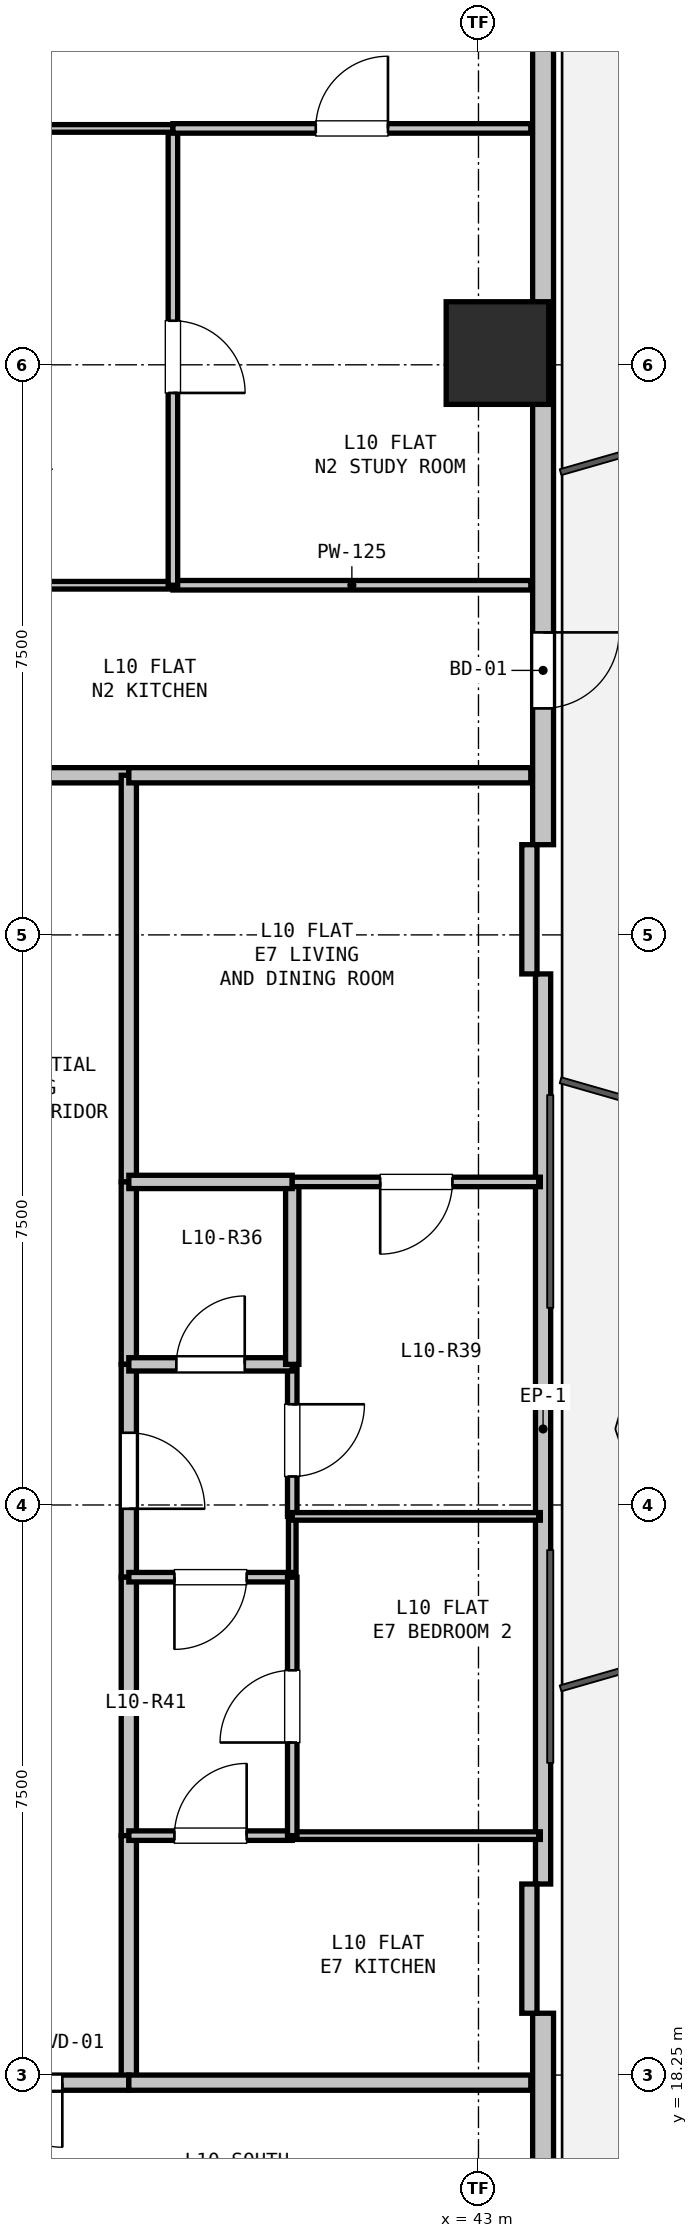
"""IFC4 building model, lengths in metres.
Left out: names, types, materials, properties, quantities, classifications, styles, units other than length and angle.
Written with IfcOpenShell. Run it as: python <this file> out.ifc"""

import sys

from ifc_helpers import new_model, si_unit, direction, frame, frame_2d, origin, origin_2d, place, context, subcontext, project, spatial, rectangle, hollow_rectangle, extrude, element, fill, save


model = new_model("IFC4")
c1 = context("Model", 3, precision=1e-05, world=origin(), true_north=direction((0.0, 1.0)))
c2 = subcontext(c1, "Body", "Model", "MODEL_VIEW")
j1 = project(units=[si_unit("LENGTHUNIT", "METRE"), si_unit("PLANEANGLEUNIT", "RADIAN")], contexts=[c1])
p1 = place(None, origin())
s1 = spatial("IfcSite", under=j1, at=p1, CompositionType="ELEMENT")
p2 = place(p1, origin())
s2 = spatial("IfcBuilding", under=s1, at=p2, CompositionType="ELEMENT")
p3 = place(p2, frame((0.0, 0.0, 39.0)))
s3 = spatial("IfcBuildingStorey", under=s2, at=p3, CompositionType="ELEMENT", Elevation=39.0)
p4 = place(p3, frame((43.25, 40.905, 0.0), z_axis=(0.0, 0.0, 1.0), x_axis=(1.0, 0.0, 0.0)))
e1 = element("IfcColumn", 1, at=p4, inside=s3, PredefinedType="COLUMN", context=c2, shape_type="SweptSolid", body=[
    extrude(hollow_rectangle(XDim=1.35, YDim=1.35, WallThickness=0.036, at=origin_2d()), origin(), (0.0, 0.0, 1.0), 3.3),
])
p5 = place(p3, frame((28.232, 43.454, 0.0), z_axis=(0.0, 0.0, 1.0), x_axis=(0.86603192154, 0.499988710747, 0.0)))
e2 = element("IfcWall", 2, at=p5, inside=s3, PredefinedType="SOLIDWALL", context=c2, shape_type="SweptSolid", body=[
    extrude(rectangle(XDim=12.673, YDim=0.275, at=frame_2d((6.336, 0.0))), origin(), (0.0, 0.0, 1.0), 2.66),
])
p6 = place(p5, frame((2.96, 0.0, 0.9)))
e3 = element("IfcOpeningElement", 3, at=p6, cuts=e2, PredefinedType="OPENING", context=c2, shape_type="SweptSolid", body=[
    extrude(rectangle(XDim=2.1, YDim=1.6, at=frame_2d((1.05, 0.8))), frame((0.0, 0.147, 0.0), z_axis=(0.0, -1.0, 0.0), x_axis=(1.0, 0.0, 0.0)), (0.0, 0.0, 1.0), 0.295),
])
p7 = place(p3, frame((43.85, 47.11, 0.0), z_axis=(0.0, 0.0, 1.0), x_axis=(0.0, -1.0, 0.0)))
e4 = element("IfcWall", 4, at=p7, inside=s3, PredefinedType="SOLIDWALL", context=c2, shape_type="SweptSolid", body=[
    extrude(rectangle(XDim=12.673, YDim=0.275, at=frame_2d((6.336, 0.0))), origin(), (0.0, 0.0, 1.0), 2.66),
])
p8 = place(p7, frame((9.88, 0.0, 0.0)))
e5 = element("IfcOpeningElement", 5, at=p8, cuts=e4, PredefinedType="OPENING", context=c2, shape_type="SweptSolid", body=[
    extrude(rectangle(XDim=1.0, YDim=2.1, at=frame_2d((0.5, 1.05))), frame((0.0, 0.147, 0.0), z_axis=(0.0, -1.0, 0.0), x_axis=(1.0, 0.0, 0.0)), (0.0, 0.0, 1.0), 0.295),
])
p9 = place(p3, frame((43.85, 32.737, 0.0), z_axis=(0.0, 0.0, 1.0), x_axis=(0.0, -1.0, 0.0)))
e6 = element("IfcWall", 6, at=p9, inside=s3, PredefinedType="PARAPET", context=c2, shape_type="SweptSolid", body=[
    extrude(rectangle(XDim=11.973, YDim=0.2, at=frame_2d((5.987, 0.0))), origin(), (0.0, 0.0, 1.0), 0.2),
])
p10 = place(p3, frame((43.85, 19.063, 0.0), z_axis=(0.0, 0.0, 1.0), x_axis=(0.0, -1.0, 0.0)))
e7 = element("IfcWall", 7, at=p10, inside=s3, PredefinedType="SOLIDWALL", context=c2, shape_type="SweptSolid", body=[
    extrude(rectangle(XDim=12.673, YDim=0.275, at=frame_2d((6.336, 0.0))), origin(), (0.0, 0.0, 1.0), 2.66),
])
for number, where, z_axis, x_axis in (
    (8, (43.67, 34.437, 0.0), (0.0, 0.0, 1.0), (0.0, -1.0, 0.0)),
    (9, (43.67, 20.763, 0.0), (0.0, 0.0, 1.0), (0.0, -1.0, 0.0)),
):
    element("IfcWall", number, at=place(p3, frame(where, z_axis=z_axis, x_axis=x_axis)), inside=s3, PredefinedType="PARAPET", context=c2, shape_type="SweptSolid", body=[
        extrude(rectangle(XDim=1.7, YDim=0.2, at=frame_2d((0.85, 0.0))), origin(), (0.0, 0.0, 1.0), 2.66),
    ])
p11 = place(p3, frame((35.8, 35.35, 0.0), z_axis=(0.0, 0.0, 1.0), x_axis=(1.0, 0.0, 0.0)))
e10 = element("IfcWall", 10, at=p11, inside=s3, PredefinedType="PARTITIONING", context=c2, shape_type="SweptSolid", body=[
    extrude(rectangle(XDim=2.6, YDim=0.2, at=frame_2d((1.3, 0.0))), origin(), (0.0, 0.0, 1.0), 2.337),
])
p12 = place(p3, frame((38.4, 35.35, 0.0), z_axis=(0.0, 0.0, 1.0), x_axis=(0.0, -1.0, 0.0)))
e11 = element("IfcWall", 11, at=p12, inside=s3, PredefinedType="PARTITIONING", context=c2, shape_type="SweptSolid", body=[
    extrude(rectangle(XDim=5.35, YDim=0.2, at=frame_2d((2.675, 0.0))), origin(), (0.0, 0.0, 1.0), 2.337),
])
p13 = place(p3, frame((38.4, 30.0, 0.0), z_axis=(0.0, 0.0, 1.0), x_axis=(0.0, -1.0, 0.0)))
e12 = element("IfcWall", 12, at=p13, inside=s3, PredefinedType="PARTITIONING", context=c2, shape_type="SweptSolid", body=[
    extrude(rectangle(XDim=2.4, YDim=0.2, at=frame_2d((1.2, 0.0))), origin(), (0.0, 0.0, 1.0), 3.04),
])
p14 = place(p3, frame((38.4, 27.6, 0.0), z_axis=(0.0, 0.0, 1.0), x_axis=(0.0, -1.0, 0.0)))
e13 = element("IfcWall", 13, at=p14, inside=s3, PredefinedType="PARTITIONING", context=c2, shape_type="SweptSolid", body=[
    extrude(rectangle(XDim=2.8, YDim=0.2, at=frame_2d((1.4, 0.0))), origin(), (0.0, 0.0, 1.0), 3.04),
])
p15 = place(p14, frame((0.9, 0.0, 0.0)))
e14 = element("IfcOpeningElement", 14, at=p15, cuts=e13, PredefinedType="OPENING", context=c2, shape_type="SweptSolid", body=[
    extrude(rectangle(XDim=1.0, YDim=2.15, at=frame_2d((0.5, 1.075))), frame((0.0, 0.11, 0.0), z_axis=(0.0, -1.0, 0.0), x_axis=(1.0, 0.0, 0.0)), (0.0, 0.0, 1.0), 0.22),
])
p16 = place(p3, frame((38.4, 24.8, 0.0), z_axis=(0.0, 0.0, 1.0), x_axis=(0.0, -1.0, 0.0)))
e15 = element("IfcWall", 15, at=p16, inside=s3, PredefinedType="PARTITIONING", context=c2, shape_type="SweptSolid", body=[
    extrude(rectangle(XDim=3.4, YDim=0.2, at=frame_2d((1.7, 0.0))), origin(), (0.0, 0.0, 1.0), 3.04),
])
p17 = place(p3, frame((38.4, 21.4, 0.0), z_axis=(0.0, 0.0, 1.0), x_axis=(0.0, -1.0, 0.0)))
e16 = element("IfcWall", 16, at=p17, inside=s3, PredefinedType="PARTITIONING", context=c2, shape_type="SweptSolid", body=[
    extrude(rectangle(XDim=3.25, YDim=0.2, at=frame_2d((1.625, 0.0))), origin(), (0.0, 0.0, 1.0), 3.04),
])
p18 = place(p3, frame((38.4, 18.15, 0.0), z_axis=(0.0, 0.0, 1.0), x_axis=(-1.0, 0.0, 0.0)))
e17 = element("IfcWall", 17, at=p18, inside=s3, PredefinedType="PARTITIONING", context=c2, shape_type="SweptSolid", body=[
    extrude(rectangle(XDim=2.6, YDim=0.2, at=frame_2d((1.3, 0.0))), origin(), (0.0, 0.0, 1.0), 2.337),
])
p19 = place(p18, frame((0.875, 0.0, 0.0)))
e18 = element("IfcOpeningElement", 18, at=p19, cuts=e17, PredefinedType="OPENING", context=c2, shape_type="SweptSolid", body=[
    extrude(rectangle(XDim=0.85, YDim=2.1, at=frame_2d((0.425, 1.05))), frame((0.0, 0.11, 0.0), z_axis=(0.0, -1.0, 0.0), x_axis=(1.0, 0.0, 0.0)), (0.0, 0.0, 1.0), 0.22),
])
p20 = place(p3, frame((40.55, 27.6, 0.0), z_axis=(0.0, 0.0, 1.0), x_axis=(0.0, -1.0, 0.0)))
e19 = element("IfcWall", 19, at=p20, inside=s3, PredefinedType="PARTITIONING", context=c2, shape_type="SweptSolid", body=[
    extrude(rectangle(XDim=2.0, YDim=0.125, at=frame_2d((1.0, 0.0))), origin(), (0.0, 0.0, 1.0), 3.04),
])
p21 = place(p20, frame((0.525, 0.0, 0.0)))
e20 = element("IfcOpeningElement", 20, at=p21, cuts=e19, PredefinedType="OPENING", context=c2, shape_type="SweptSolid", body=[
    extrude(rectangle(XDim=0.95, YDim=2.1, at=frame_2d((0.475, 1.05))), frame((0.0, 0.073, 0.0), z_axis=(0.0, -1.0, 0.0), x_axis=(1.0, 0.0, 0.0)), (0.0, 0.0, 1.0), 0.145),
])
p22 = place(p3, frame((40.55, 25.6, 0.0), z_axis=(0.0, 0.0, 1.0), x_axis=(0.0, -1.0, 0.0)))
e21 = element("IfcWall", 21, at=p22, inside=s3, PredefinedType="PARTITIONING", context=c2, shape_type="SweptSolid", body=[
    extrude(rectangle(XDim=0.8, YDim=0.1, at=frame_2d((0.4, 0.0))), origin(), (0.0, 0.0, 1.0), 3.04),
])
p23 = place(p3, frame((40.55, 24.8, 0.0), z_axis=(0.0, 0.0, 1.0), x_axis=(-1.0, 0.0, 0.0)))
e22 = element("IfcWall", 22, at=p23, inside=s3, PredefinedType="PARTITIONING", context=c2, shape_type="SweptSolid", body=[
    extrude(rectangle(XDim=2.15, YDim=0.125, at=frame_2d((1.075, 0.0))), origin(), (0.0, 0.0, 1.0), 3.04),
])
p24 = place(p23, frame((0.6, 0.0, 0.0)))
e23 = element("IfcOpeningElement", 23, at=p24, cuts=e22, PredefinedType="OPENING", context=c2, shape_type="SweptSolid", body=[
    extrude(rectangle(XDim=0.95, YDim=2.1, at=frame_2d((0.475, 1.05))), frame((0.0, 0.073, 0.0), z_axis=(0.0, -1.0, 0.0), x_axis=(1.0, 0.0, 0.0)), (0.0, 0.0, 1.0), 0.145),
])
p25 = place(p3, frame((38.4, 27.6, 0.0), z_axis=(0.0, 0.0, 1.0), x_axis=(1.0, 0.0, 0.0)))
e24 = element("IfcWall", 24, at=p25, inside=s3, PredefinedType="PLUMBINGWALL", context=c2, shape_type="SweptSolid", body=[
    extrude(rectangle(XDim=2.15, YDim=0.175, at=frame_2d((1.075, 0.0))), origin(), (0.0, 0.0, 1.0), 3.04),
])
p26 = place(p25, frame((0.625, 0.0, 0.0)))
e25 = element("IfcOpeningElement", 25, at=p26, cuts=e24, PredefinedType="OPENING", context=c2, shape_type="SweptSolid", body=[
    extrude(rectangle(XDim=0.9, YDim=2.1, at=frame_2d((0.45, 1.05))), frame((0.0, 0.097, 0.0), z_axis=(0.0, -1.0, 0.0), x_axis=(1.0, 0.0, 0.0)), (0.0, 0.0, 1.0), 0.195),
])
p27 = place(p3, frame((43.688, 35.35, 0.0), z_axis=(0.0, 0.0, 1.0), x_axis=(-1.0, 0.0, 0.0)))
e26 = element("IfcWall", 26, at=p27, inside=s3, PredefinedType="PARTITIONING", context=c2, shape_type="SweptSolid", body=[
    extrude(rectangle(XDim=5.289, YDim=0.2, at=frame_2d((2.644, 0.0))), origin(), (0.0, 0.0, 1.0), 2.337),
])
p28 = place(p3, frame((34.1, 37.85, 0.0), z_axis=(0.0, 0.0, 1.0), x_axis=(1.0, 0.0, 0.0)))
e27 = element("IfcWall", 27, at=p28, inside=s3, PredefinedType="PARTITIONING", context=c2, shape_type="SweptSolid", body=[
    extrude(rectangle(XDim=4.88, YDim=0.1, at=frame_2d((2.44, 0.0))), origin(), (0.0, 0.0, 1.0), 2.337),
])
p29 = place(p3, frame((38.98, 37.85, 0.0), z_axis=(0.0, 0.0, 1.0), x_axis=(1.0, 0.0, 0.0)))
e28 = element("IfcWall", 28, at=p29, inside=s3, PredefinedType="PARTITIONING", context=c2, shape_type="SweptSolid", body=[
    extrude(rectangle(XDim=4.708, YDim=0.125, at=frame_2d((2.354, 0.0))), origin(), (0.0, 0.0, 1.0), 2.337),
])
p30 = place(p3, frame((40.55, 30.0, 0.0), z_axis=(0.0, 0.0, 1.0), x_axis=(0.0, -1.0, 0.0)))
e29 = element("IfcWall", 29, at=p30, inside=s3, PredefinedType="PLUMBINGWALL", context=c2, shape_type="SweptSolid", body=[
    extrude(rectangle(XDim=2.4, YDim=0.175, at=frame_2d((1.2, 0.0))), origin(), (0.0, 0.0, 1.0), 3.04),
])
p31 = place(p3, frame((38.4, 30.0, 0.0), z_axis=(0.0, 0.0, 1.0), x_axis=(1.0, 0.0, 0.0)))
e30 = element("IfcWall", 30, at=p31, inside=s3, PredefinedType="PLUMBINGWALL", context=c2, shape_type="SweptSolid", body=[
    extrude(rectangle(XDim=2.15, YDim=0.175, at=frame_2d((1.075, 0.0))), origin(), (0.0, 0.0, 1.0), 3.04),
])
p32 = place(p3, frame((38.4, 21.4, 0.0), z_axis=(0.0, 0.0, 1.0), x_axis=(1.0, 0.0, 0.0)))
e31 = element("IfcWall", 31, at=p32, inside=s3, PredefinedType="PARTITIONING", context=c2, shape_type="SweptSolid", body=[
    extrude(rectangle(XDim=2.15, YDim=0.125, at=frame_2d((1.075, 0.0))), origin(), (0.0, 0.0, 1.0), 3.04),
])
p33 = place(p32, frame((0.6, 0.0, 0.0)))
e32 = element("IfcOpeningElement", 32, at=p33, cuts=e31, PredefinedType="OPENING", context=c2, shape_type="SweptSolid", body=[
    extrude(rectangle(XDim=0.95, YDim=2.1, at=frame_2d((0.475, 1.05))), frame((0.0, 0.073, 0.0), z_axis=(0.0, -1.0, 0.0), x_axis=(1.0, 0.0, 0.0)), (0.0, 0.0, 1.0), 0.145),
])
p34 = place(p3, frame((40.55, 21.4, 0.0), z_axis=(0.0, 0.0, 1.0), x_axis=(1.0, 0.0, 0.0)))
e33 = element("IfcWall", 33, at=p34, inside=s3, PredefinedType="PARTITIONING", context=c2, shape_type="SweptSolid", body=[
    extrude(rectangle(XDim=3.264, YDim=0.1, at=frame_2d((1.632, 0.0))), origin(), (0.0, 0.0, 1.0), 2.365),
])
p35 = place(p3, frame((43.688, 18.15, 0.0), z_axis=(0.0, 0.0, 1.0), x_axis=(-1.0, 0.0, 0.0)))
e34 = element("IfcWall", 34, at=p35, inside=s3, PredefinedType="PARTITIONING", context=c2, shape_type="SweptSolid", body=[
    extrude(rectangle(XDim=5.289, YDim=0.2, at=frame_2d((2.644, 0.0))), origin(), (0.0, 0.0, 1.0), 2.365),
])
p36 = place(p3, frame((38.98, 43.86, 0.0), z_axis=(0.0, 0.0, 1.0), x_axis=(0.0, -1.0, 0.0)))
e35 = element("IfcWall", 35, at=p36, inside=s3, PredefinedType="PARTITIONING", context=c2, shape_type="SweptSolid", body=[
    extrude(rectangle(XDim=6.01, YDim=0.125, at=frame_2d((3.005, 0.0))), origin(), (0.0, 0.0, 1.0), 3.04),
])
p37 = place(p36, frame((2.53, 0.0, 0.0)))
e36 = element("IfcOpeningElement", 36, at=p37, cuts=e35, PredefinedType="OPENING", context=c2, shape_type="SweptSolid", body=[
    extrude(rectangle(XDim=0.95, YDim=2.1, at=frame_2d((0.475, 1.05))), frame((0.0, 0.073, 0.0), z_axis=(0.0, -1.0, 0.0), x_axis=(1.0, 0.0, 0.0)), (0.0, 0.0, 1.0), 0.145),
])
p38 = place(p3, frame((34.1, 43.86, 0.0), z_axis=(0.0, 0.0, 1.0), x_axis=(1.0, 0.0, 0.0)))
e37 = element("IfcWall", 37, at=p38, inside=s3, PredefinedType="PARTITIONING", context=c2, shape_type="SweptSolid", body=[
    extrude(rectangle(XDim=4.88, YDim=0.1, at=frame_2d((2.44, 0.0))), origin(), (0.0, 0.0, 1.0), 2.337),
])
p39 = place(p38, frame((1.965, 0.0, 0.0)))
e38 = element("IfcOpeningElement", 38, at=p39, cuts=e37, PredefinedType="OPENING", context=c2, shape_type="SweptSolid", body=[
    extrude(rectangle(XDim=0.95, YDim=2.1, at=frame_2d((0.475, 1.05))), frame((0.0, 0.06, 0.0), z_axis=(0.0, -1.0, 0.0), x_axis=(1.0, 0.0, 0.0)), (0.0, 0.0, 1.0), 0.12),
])
p40 = place(p3, frame((38.98, 43.86, 0.0), z_axis=(0.0, 0.0, 1.0), x_axis=(1.0, 0.0, 0.0)))
e39 = element("IfcWall", 39, at=p40, inside=s3, PredefinedType="PARTITIONING", context=c2, shape_type="SweptSolid", body=[
    extrude(rectangle(XDim=4.708, YDim=0.125, at=frame_2d((2.354, 0.0))), origin(), (0.0, 0.0, 1.0), 2.65),
])
p41 = place(p40, frame((1.879, 0.0, 0.0)))
e40 = element("IfcOpeningElement", 40, at=p41, cuts=e39, PredefinedType="OPENING", context=c2, shape_type="SweptSolid", body=[
    extrude(rectangle(XDim=0.95, YDim=2.1, at=frame_2d((0.475, 1.05))), frame((0.0, 0.073, 0.0), z_axis=(0.0, -1.0, 0.0), x_axis=(1.0, 0.0, 0.0)), (0.0, 0.0, 1.0), 0.145),
])
p42 = place(p3, frame((43.814, 30.0, 0.0), z_axis=(0.0, 0.0, 1.0), x_axis=(-1.0, 0.0, 0.0)))
e41 = element("IfcWall", 41, at=p42, inside=s3, PredefinedType="PARTITIONING", context=c2, shape_type="SweptSolid", body=[
    extrude(rectangle(XDim=3.264, YDim=0.125, at=frame_2d((1.632, 0.0))), origin(), (0.0, 0.0, 1.0), 2.365),
])
p43 = place(p42, frame((1.157, 0.0, 0.0)))
e42 = element("IfcOpeningElement", 42, at=p43, cuts=e41, PredefinedType="OPENING", context=c2, shape_type="SweptSolid", body=[
    extrude(rectangle(XDim=0.95, YDim=2.1, at=frame_2d((0.475, 1.05))), frame((0.0, 0.073, 0.0), z_axis=(0.0, -1.0, 0.0), x_axis=(1.0, 0.0, 0.0)), (0.0, 0.0, 1.0), 0.145),
])
p44 = place(p3, frame((43.814, 25.6, 0.0), z_axis=(0.0, 0.0, 1.0), x_axis=(-1.0, 0.0, 0.0)))
e43 = element("IfcWall", 43, at=p44, inside=s3, PredefinedType="PARTITIONING", context=c2, shape_type="SweptSolid", body=[
    extrude(rectangle(XDim=3.264, YDim=0.1, at=frame_2d((1.632, 0.0))), origin(), (0.0, 0.0, 1.0), 2.365),
])
p45 = place(p3, frame((40.55, 21.4, 0.0), z_axis=(0.0, 0.0, 1.0), x_axis=(0.0, 1.0, 0.0)))
e44 = element("IfcWall", 44, at=p45, inside=s3, PredefinedType="PARTITIONING", context=c2, shape_type="SweptSolid", body=[
    extrude(rectangle(XDim=3.4, YDim=0.125, at=frame_2d((1.7, 0.0))), origin(), (0.0, 0.0, 1.0), 3.04),
])
p46 = place(p45, frame((1.225, 0.0, 0.0)))
e45 = element("IfcOpeningElement", 45, at=p46, cuts=e44, PredefinedType="OPENING", context=c2, shape_type="SweptSolid", body=[
    extrude(rectangle(XDim=0.95, YDim=2.1, at=frame_2d((0.475, 1.05))), frame((0.0, 0.073, 0.0), z_axis=(0.0, -1.0, 0.0), x_axis=(1.0, 0.0, 0.0)), (0.0, 0.0, 1.0), 0.145),
])
p47 = place(p8, origin())
e46 = element("IfcDoor", 46, at=p47, inside=s3, OperationType="SINGLE_SWING_LEFT", PredefinedType="DOOR", context=c2, shape_type="SweptSolid", body=[
    extrude(rectangle(XDim=1.0, YDim=2.1, at=frame_2d((0.5, 1.05))), frame((0.0, 0.025, 0.0), z_axis=(0.0, -1.0, 0.0), x_axis=(1.0, 0.0, 0.0)), (0.0, 0.0, 1.0), 0.05),
])
fill(e5, e46)
p48 = place(p15, origin())
e47 = element("IfcDoor", 47, at=p48, inside=s3, OperationType="SINGLE_SWING_RIGHT", PredefinedType="DOOR", context=c2, shape_type="SweptSolid", body=[
    extrude(rectangle(XDim=1.0, YDim=2.15, at=frame_2d((0.5, 1.075))), frame((0.0, 0.025, 0.0), z_axis=(0.0, -1.0, 0.0), x_axis=(1.0, 0.0, 0.0)), (0.0, 0.0, 1.0), 0.05),
])
fill(e14, e47)
p49 = place(p19, origin())
e48 = element("IfcDoor", 48, at=p49, inside=s3, OperationType="SINGLE_SWING_LEFT", PredefinedType="DOOR", context=c2, shape_type="SweptSolid", body=[
    extrude(rectangle(XDim=0.85, YDim=2.1, at=frame_2d((0.425, 1.05))), frame((0.0, 0.025, 0.0), z_axis=(0.0, -1.0, 0.0), x_axis=(1.0, 0.0, 0.0)), (0.0, 0.0, 1.0), 0.05),
])
fill(e18, e48)
p50 = place(p26, origin())
e49 = element("IfcDoor", 49, at=p50, inside=s3, OperationType="SINGLE_SWING_RIGHT", PredefinedType="DOOR", context=c2, shape_type="SweptSolid", body=[
    extrude(rectangle(XDim=0.9, YDim=2.1, at=frame_2d((0.45, 1.05))), frame((0.0, 0.025, 0.0), z_axis=(0.0, -1.0, 0.0), x_axis=(1.0, 0.0, 0.0)), (0.0, 0.0, 1.0), 0.05),
])
fill(e25, e49)
p51 = place(p21, origin())
e50 = element("IfcDoor", 50, at=p51, inside=s3, OperationType="SINGLE_SWING_LEFT", PredefinedType="DOOR", context=c2, shape_type="SweptSolid", body=[
    extrude(rectangle(XDim=0.95, YDim=2.1, at=frame_2d((0.475, 1.05))), frame((0.0, 0.025, 0.0), z_axis=(0.0, -1.0, 0.0), x_axis=(1.0, 0.0, 0.0)), (0.0, 0.0, 1.0), 0.05),
])
fill(e20, e50)
p52 = place(p24, origin())
e51 = element("IfcDoor", 51, at=p52, inside=s3, OperationType="SINGLE_SWING_RIGHT", PredefinedType="DOOR", context=c2, shape_type="SweptSolid", body=[
    extrude(rectangle(XDim=0.95, YDim=2.1, at=frame_2d((0.475, 1.05))), frame((0.0, 0.025, 0.0), z_axis=(0.0, -1.0, 0.0), x_axis=(1.0, 0.0, 0.0)), (0.0, 0.0, 1.0), 0.05),
])
fill(e23, e51)
p53 = place(p33, origin())
e52 = element("IfcDoor", 52, at=p53, inside=s3, OperationType="SINGLE_SWING_RIGHT", PredefinedType="DOOR", context=c2, shape_type="SweptSolid", body=[
    extrude(rectangle(XDim=0.95, YDim=2.1, at=frame_2d((0.475, 1.05))), frame((0.0, 0.025, 0.0), z_axis=(0.0, -1.0, 0.0), x_axis=(1.0, 0.0, 0.0)), (0.0, 0.0, 1.0), 0.05),
])
fill(e32, e52)
p54 = place(p37, origin())
e53 = element("IfcDoor", 53, at=p54, inside=s3, OperationType="SINGLE_SWING_RIGHT", PredefinedType="DOOR", context=c2, shape_type="SweptSolid", body=[
    extrude(rectangle(XDim=0.95, YDim=2.1, at=frame_2d((0.475, 1.05))), frame((0.0, 0.025, 0.0), z_axis=(0.0, -1.0, 0.0), x_axis=(1.0, 0.0, 0.0)), (0.0, 0.0, 1.0), 0.05),
])
fill(e36, e53)
p55 = place(p41, origin())
e54 = element("IfcDoor", 54, at=p55, inside=s3, OperationType="SINGLE_SWING_RIGHT", PredefinedType="DOOR", context=c2, shape_type="SweptSolid", body=[
    extrude(rectangle(XDim=0.95, YDim=2.1, at=frame_2d((0.475, 1.05))), frame((0.0, 0.025, 0.0), z_axis=(0.0, -1.0, 0.0), x_axis=(1.0, 0.0, 0.0)), (0.0, 0.0, 1.0), 0.05),
])
fill(e40, e54)
p56 = place(p43, origin())
e55 = element("IfcDoor", 55, at=p56, inside=s3, OperationType="SINGLE_SWING_RIGHT", PredefinedType="DOOR", context=c2, shape_type="SweptSolid", body=[
    extrude(rectangle(XDim=0.95, YDim=2.1, at=frame_2d((0.475, 1.05))), frame((0.0, 0.025, 0.0), z_axis=(0.0, -1.0, 0.0), x_axis=(1.0, 0.0, 0.0)), (0.0, 0.0, 1.0), 0.05),
])
fill(e42, e55)
p57 = place(p46, origin())
e56 = element("IfcDoor", 56, at=p57, inside=s3, OperationType="SINGLE_SWING_LEFT", PredefinedType="DOOR", context=c2, shape_type="SweptSolid", body=[
    extrude(rectangle(XDim=0.95, YDim=2.1, at=frame_2d((0.475, 1.05))), frame((0.0, 0.025, 0.0), z_axis=(0.0, -1.0, 0.0), x_axis=(1.0, 0.0, 0.0)), (0.0, 0.0, 1.0), 0.05),
])
fill(e45, e56)
save(model, sys.argv[1])
